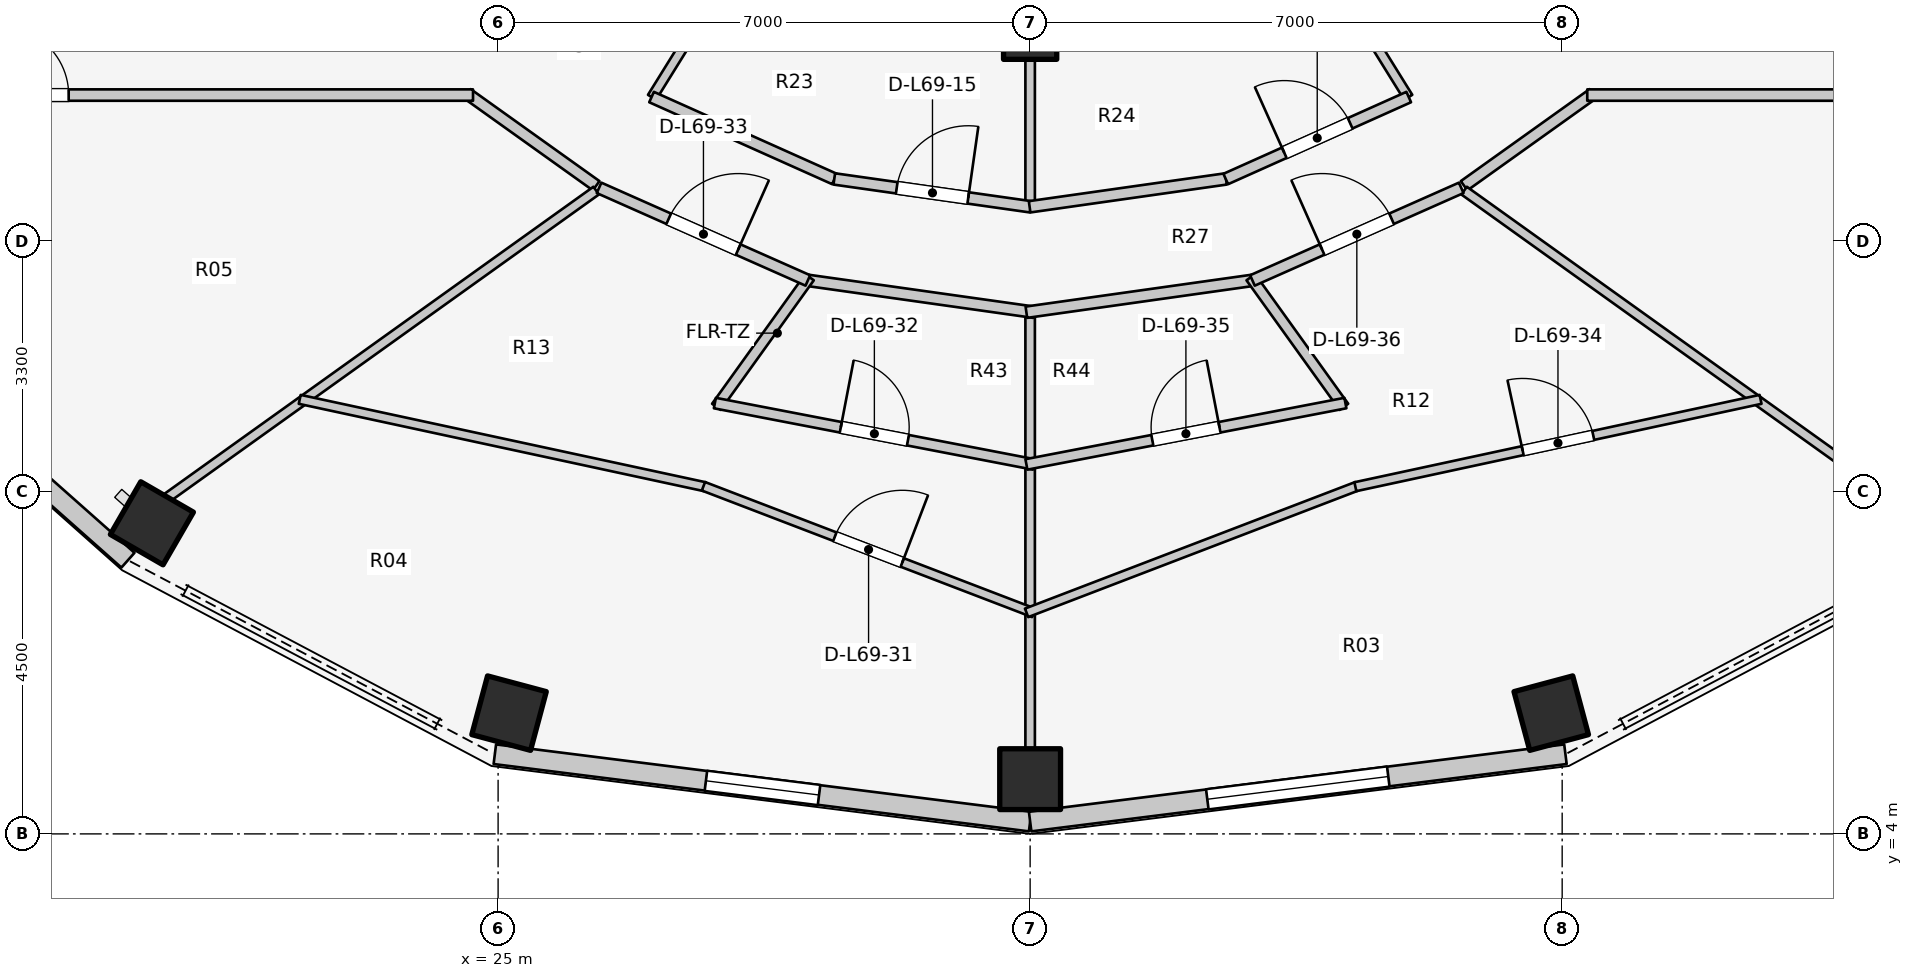
"""IFC4 building model, lengths in metres.
Left out: names, types, materials, properties, quantities, classifications, styles, units other than length and angle.
Written with IfcOpenShell. Run it as: python <this file> out.ifc"""

import sys

from ifc_helpers import new_model, si_unit, direction, frame, frame_2d, origin, origin_2d, place, context, subcontext, project, spatial, rectangle, extrude, element, fill, save


model = new_model("IFC4")
c1 = context("Model", 3, precision=1e-05, world=origin(), true_north=direction((0.0, 1.0)))
c2 = subcontext(c1, "Body", "Model", "MODEL_VIEW")
j1 = project(units=[si_unit("LENGTHUNIT", "METRE"), si_unit("PLANEANGLEUNIT", "RADIAN")], contexts=[c1])
p1 = place(None, origin())
s1 = spatial("IfcSite", under=j1, at=p1, CompositionType="ELEMENT")
p2 = place(p1, origin())
s2 = spatial("IfcBuilding", under=s1, at=p2, CompositionType="ELEMENT")
p3 = place(p2, frame((0.0, 0.0, 226.4)))
s3 = spatial("IfcBuildingStorey", under=s2, at=p3, CompositionType="ELEMENT", Elevation=226.4)
for number, where, z_axis, x_axis in (
    (1, (20.445, 8.086, 0.0), (0.0, 0.0, 1.0), (-0.5, -0.866, 0.0)),
    (2, (25.144, 5.589, 0.0), (0.0, 0.0, 1.0), (-0.259, -0.966, 0.0)),
):
    element("IfcColumn", number, at=place(p3, frame(where, z_axis=z_axis, x_axis=x_axis)), inside=s3, PredefinedType="COLUMN", context=c2, shape_type="SweptSolid", body=[
        extrude(rectangle(XDim=0.8, YDim=0.8, at=origin_2d()), origin(), (0.0, 0.0, 1.0), 3.1),
    ])
p4 = place(p3, frame((32.0, 14.54, 0.0), z_axis=(0.0, 0.0, 1.0), x_axis=(1.0, 0.0, 0.0)))
e3 = element("IfcColumn", 3, at=p4, inside=s3, PredefinedType="COLUMN", context=c2, shape_type="SweptSolid", body=[
    extrude(rectangle(XDim=0.7, YDim=0.7, at=origin_2d()), origin(), (0.0, 0.0, 1.0), 3.1),
])
for number, where, z_axis, x_axis in (
    (4, (32.0, 4.72, 0.0), (0.0, 0.0, 1.0), (0.0, -1.0, 0.0)),
    (5, (38.856, 5.589, 0.0), (0.0, 0.0, 1.0), (0.259, -0.966, 0.0)),
):
    element("IfcColumn", number, at=place(p3, frame(where, z_axis=z_axis, x_axis=x_axis)), inside=s3, PredefinedType="COLUMN", context=c2, shape_type="SweptSolid", body=[
        extrude(rectangle(XDim=0.8, YDim=0.8, at=origin_2d()), origin(), (0.0, 0.0, 1.0), 3.1),
    ])
p5 = place(p3, frame((16.442, 10.871, 0.0), z_axis=(0.0, 0.0, 1.0), x_axis=(0.748165854006, -0.663511759428, 0.0)))
e6 = element("IfcWall", 6, at=p5, inside=s3, PredefinedType="STANDARD", context=c2, shape_type="SweptSolid", body=[
    extrude(rectangle(XDim=4.929, YDim=0.26, at=frame_2d((2.464, 0.0))), origin(), (0.0, 0.0, 1.0), 2.85),
])
p6 = place(p3, frame((24.957, 5.048, 0.0), z_axis=(0.0, 0.0, 1.0), x_axis=(0.992180211307, -0.124813574142, 0.0)))
e7 = element("IfcWall", 7, at=p6, inside=s3, PredefinedType="STANDARD", context=c2, shape_type="SweptSolid", body=[
    extrude(rectangle(XDim=7.098, YDim=0.26, at=frame_2d((3.549, 0.0))), origin(), (0.0, 0.0, 1.0), 2.85),
])
p7 = place(p6, frame((2.799, 0.0, 0.75)))
e8 = element("IfcOpeningElement", 8, at=p7, cuts=e7, PredefinedType="OPENING", context=c2, shape_type="SweptSolid", body=[
    extrude(rectangle(XDim=1.5, YDim=1.6, at=frame_2d((0.75, 0.8))), frame((0.0, 0.14, 0.0), z_axis=(0.0, -1.0, 0.0), x_axis=(1.0, 0.0, 0.0)), (0.0, 0.0, 1.0), 0.28),
])
p8 = place(p3, frame((32.0, 4.162, 0.0), z_axis=(0.0, 0.0, 1.0), x_axis=(0.992180211307, 0.124813574142, 0.0)))
e9 = element("IfcWall", 9, at=p8, inside=s3, PredefinedType="STANDARD", context=c2, shape_type="SweptSolid", body=[
    extrude(rectangle(XDim=7.098, YDim=0.26, at=frame_2d((3.549, 0.0))), origin(), (0.0, 0.0, 1.0), 2.85),
])
p9 = place(p8, frame((2.349, 0.0, 0.75)))
e10 = element("IfcOpeningElement", 10, at=p9, cuts=e9, PredefinedType="OPENING", context=c2, shape_type="SweptSolid", body=[
    extrude(rectangle(XDim=2.4, YDim=1.7, at=frame_2d((1.2, 0.85))), frame((0.0, 0.14, 0.0), z_axis=(0.0, -1.0, 0.0), x_axis=(1.0, 0.0, 0.0)), (0.0, 0.0, 1.0), 0.28),
])
p10 = place(p3, frame((28.45, 15.985, 0.0), z_axis=(0.0, 0.0, 1.0), x_axis=(-0.527527080983, -0.849538215049, 0.0)))
e11 = element("IfcWall", 11, at=p10, inside=s3, PredefinedType="PARTITIONING", context=c2, shape_type="SweptSolid", body=[
    extrude(rectangle(XDim=2.701, YDim=0.125, at=frame_2d((1.351, 0.0))), origin(), (0.0, 0.0, 1.0), 2.376),
])
p11 = place(p3, frame((32.0, 14.9, 0.0), z_axis=(0.0, 0.0, 1.0), x_axis=(0.0, -1.0, 0.0)))
e12 = element("IfcWall", 12, at=p11, inside=s3, PredefinedType="PARTITIONING", context=c2, shape_type="SweptSolid", body=[
    extrude(rectangle(XDim=2.65, YDim=0.125, at=frame_2d((1.325, 0.0))), origin(), (0.0, 0.0, 1.0), 2.376),
])
p12 = place(p3, frame((35.55, 15.985, 0.0), z_axis=(0.0, 0.0, 1.0), x_axis=(0.527527080983, -0.849538215049, 0.0)))
e13 = element("IfcWall", 13, at=p12, inside=s3, PredefinedType="PARTITIONING", context=c2, shape_type="SweptSolid", body=[
    extrude(rectangle(XDim=2.701, YDim=0.125, at=frame_2d((1.351, 0.0))), origin(), (0.0, 0.0, 1.0), 2.376),
])
p13 = place(p3, frame((27.019, 13.694, 0.0), z_axis=(0.0, 0.0, 1.0), x_axis=(0.912628408652, -0.408790151203, 0.0)))
e14 = element("IfcWall", 14, at=p13, inside=s3, PredefinedType="PARTITIONING", context=c2, shape_type="SweptSolid", body=[
    extrude(rectangle(XDim=2.638, YDim=0.15, at=frame_2d((1.319, 0.0))), origin(), (0.0, 0.0, 1.0), 2.376),
])
p14 = place(p3, frame((29.423, 12.617, 0.0), z_axis=(0.0, 0.0, 1.0), x_axis=(0.990078185178, -0.140517569133, 0.0)))
e15 = element("IfcWall", 15, at=p14, inside=s3, PredefinedType="PARTITIONING", context=c2, shape_type="SweptSolid", body=[
    extrude(rectangle(XDim=2.61, YDim=0.15, at=frame_2d((1.305, 0.0))), origin(), (0.0, 0.0, 1.0), 2.376),
])
p15 = place(p14, frame((0.83, 0.0, 0.0)))
e16 = element("IfcOpeningElement", 16, at=p15, cuts=e15, PredefinedType="OPENING", context=c2, shape_type="SweptSolid", body=[
    extrude(rectangle(XDim=0.95, YDim=2.1, at=frame_2d((0.475, 1.05))), frame((0.0, 0.085, 0.0), z_axis=(0.0, -1.0, 0.0), x_axis=(1.0, 0.0, 0.0)), (0.0, 0.0, 1.0), 0.17),
])
p16 = place(p3, frame((31.993, 12.25, 0.0), z_axis=(0.0, 0.0, 1.0), x_axis=(0.990078185178, 0.140517569133, 0.0)))
e17 = element("IfcWall", 17, at=p16, inside=s3, PredefinedType="PARTITIONING", context=c2, shape_type="SweptSolid", body=[
    extrude(rectangle(XDim=2.61, YDim=0.15, at=frame_2d((1.305, 0.0))), origin(), (0.0, 0.0, 1.0), 2.376),
])
p17 = place(p3, frame((34.573, 12.616, 0.0), z_axis=(0.0, 0.0, 1.0), x_axis=(0.912628408652, 0.408790151203, 0.0)))
e18 = element("IfcWall", 18, at=p17, inside=s3, PredefinedType="PARTITIONING", context=c2, shape_type="SweptSolid", body=[
    extrude(rectangle(XDim=2.638, YDim=0.15, at=frame_2d((1.319, 0.0))), origin(), (0.0, 0.0, 1.0), 2.376),
])
p18 = place(p17, frame((0.844, 0.0, 0.0)))
e19 = element("IfcOpeningElement", 19, at=p18, cuts=e18, PredefinedType="OPENING", context=c2, shape_type="SweptSolid", body=[
    extrude(rectangle(XDim=0.95, YDim=2.1, at=frame_2d((0.475, 1.05))), frame((0.0, 0.085, 0.0), z_axis=(0.0, -1.0, 0.0), x_axis=(1.0, 0.0, 0.0)), (0.0, 0.0, 1.0), 0.17),
])
p19 = place(p3, frame((26.29, 12.527, 0.0), z_axis=(0.0, 0.0, 1.0), x_axis=(-0.813780999276, 0.581171648669, 0.0)))
e20 = element("IfcWall", 20, at=p19, inside=s3, PredefinedType="PARTITIONING", context=c2, shape_type="SweptSolid", body=[
    extrude(rectangle(XDim=2.082, YDim=0.15, at=frame_2d((1.041, 0.0))), origin(), (0.0, 0.0, 1.0), 2.376),
])
p20 = place(p3, frame((17.15, 13.72, 0.0), z_axis=(0.0, 0.0, 1.0), x_axis=(1.0, 0.0, 0.0)))
e21 = element("IfcWall", 21, at=p20, inside=s3, PredefinedType="PARTITIONING", context=c2, shape_type="SweptSolid", body=[
    extrude(rectangle(XDim=7.52, YDim=0.15, at=frame_2d((3.76, 0.0))), origin(), (0.0, 0.0, 1.0), 2.376),
])
p21 = place(p20, frame((1.3, 0.0, 0.0)))
e22 = element("IfcOpeningElement", 22, at=p21, cuts=e21, PredefinedType="OPENING", context=c2, shape_type="SweptSolid", body=[
    extrude(rectangle(XDim=0.9, YDim=2.1, at=frame_2d((0.45, 1.05))), frame((0.0, 0.085, 0.0), z_axis=(0.0, -1.0, 0.0), x_axis=(1.0, 0.0, 0.0)), (0.0, 0.0, 1.0), 0.17),
])
p22 = place(p3, frame((37.71, 12.527, 0.0), z_axis=(0.0, 0.0, 1.0), x_axis=(0.813780999276, 0.581171648669, 0.0)))
e23 = element("IfcWall", 23, at=p22, inside=s3, PredefinedType="PARTITIONING", context=c2, shape_type="SweptSolid", body=[
    extrude(rectangle(XDim=2.082, YDim=0.15, at=frame_2d((1.041, 0.0))), origin(), (0.0, 0.0, 1.0), 2.376),
])
p23 = place(p3, frame((39.33, 13.72, 0.0), z_axis=(0.0, 0.0, 1.0), x_axis=(1.0, 0.0, 0.0)))
e24 = element("IfcWall", 24, at=p23, inside=s3, PredefinedType="PARTITIONING", context=c2, shape_type="SweptSolid", body=[
    extrude(rectangle(XDim=7.52, YDim=0.15, at=frame_2d((3.76, 0.0))), origin(), (0.0, 0.0, 1.0), 2.376),
])
p24 = place(p23, frame((5.22, 0.0, 0.0)))
e25 = element("IfcOpeningElement", 25, at=p24, cuts=e24, PredefinedType="OPENING", context=c2, shape_type="SweptSolid", body=[
    extrude(rectangle(XDim=0.9, YDim=2.1, at=frame_2d((0.45, 1.05))), frame((0.0, 0.085, 0.0), z_axis=(0.0, -1.0, 0.0), x_axis=(1.0, 0.0, 0.0)), (0.0, 0.0, 1.0), 0.17),
])
p25 = place(p3, frame((26.29, 12.463, 0.0), z_axis=(0.0, 0.0, 1.0), x_axis=(-0.813163816543, -0.582034885093, 0.0)))
e26 = element("IfcWall", 26, at=p25, inside=s3, PredefinedType="PARTITIONING", context=c2, shape_type="SweptSolid", body=[
    extrude(rectangle(XDim=6.955, YDim=0.125, at=frame_2d((3.477, 0.0))), origin(), (0.0, 0.0, 1.0), 2.376),
])
p26 = place(p3, frame((32.0, 10.815, 0.0), z_axis=(0.0, 0.0, 1.0), x_axis=(0.0, -1.0, 0.0)))
e27 = element("IfcWall", 27, at=p26, inside=s3, PredefinedType="PARTITIONING", context=c2, shape_type="SweptSolid", body=[
    extrude(rectangle(XDim=5.715, YDim=0.125, at=frame_2d((2.857, 0.0))), origin(), (0.0, 0.0, 1.0), 2.376),
])
p27 = place(p3, frame((37.71, 12.463, 0.0), z_axis=(0.0, 0.0, 1.0), x_axis=(0.813163816543, -0.582034885093, 0.0)))
e28 = element("IfcWall", 28, at=p27, inside=s3, PredefinedType="PARTITIONING", context=c2, shape_type="SweptSolid", body=[
    extrude(rectangle(XDim=6.955, YDim=0.125, at=frame_2d((3.477, 0.0))), origin(), (0.0, 0.0, 1.0), 2.376),
])
p28 = place(p3, frame((22.39, 9.717, 0.0), z_axis=(0.0, 0.0, 1.0), x_axis=(0.977534972695, -0.210773283785, 0.0)))
e29 = element("IfcWall", 29, at=p28, inside=s3, PredefinedType="MOVABLE", context=c2, shape_type="SweptSolid", body=[
    extrude(rectangle(XDim=5.453, YDim=0.12, at=frame_2d((2.727, 0.0))), origin(), (0.0, 0.0, 1.0), 2.376),
])
p29 = place(p3, frame((27.702, 8.573, 0.0), z_axis=(0.0, 0.0, 1.0), x_axis=(0.933766866443, -0.357881878744, 0.0)))
e30 = element("IfcWall", 30, at=p29, inside=s3, PredefinedType="MOVABLE", context=c2, shape_type="SweptSolid", body=[
    extrude(rectangle(XDim=4.653, YDim=0.12, at=frame_2d((2.327, 0.0))), origin(), (0.0, 0.0, 1.0), 2.376),
])
p30 = place(p29, frame((1.852, 0.0, 0.0)))
e31 = element("IfcOpeningElement", 31, at=p30, cuts=e30, PredefinedType="OPENING", context=c2, shape_type="SweptSolid", body=[
    extrude(rectangle(XDim=0.95, YDim=2.1, at=frame_2d((0.475, 1.05))), frame((0.0, 0.07, 0.0), z_axis=(0.0, -1.0, 0.0), x_axis=(1.0, 0.0, 0.0)), (0.0, 0.0, 1.0), 0.14),
])
p31 = place(p3, frame((29.018, 11.29, 0.0), z_axis=(0.0, 0.0, 1.0), x_axis=(0.990214091671, -0.13955662885, 0.0)))
e32 = element("IfcWall", 32, at=p31, inside=s3, PredefinedType="PARTITIONING", context=c2, shape_type="SweptSolid", body=[
    extrude(rectangle(XDim=3.062, YDim=0.15, at=frame_2d((1.531, 0.0))), origin(), (0.0, 0.0, 1.0), 2.376),
])
p32 = place(p3, frame((29.097, 11.324, 0.0), z_axis=(0.0, 0.0, 1.0), x_axis=(-0.583259891741, -0.812285601673, 0.0)))
e33 = element("IfcWall", 33, at=p32, inside=s3, PredefinedType="PLUMBINGWALL", context=c2, shape_type="SweptSolid", body=[
    extrude(rectangle(XDim=2.1, YDim=0.14, at=frame_2d((1.05, 0.0))), origin(), (0.0, 0.0, 1.0), 2.385),
])
p33 = place(p3, frame((27.852, 9.668, 0.0), z_axis=(0.0, 0.0, 1.0), x_axis=(0.98198484664, -0.188959680803, 0.0)))
e34 = element("IfcWall", 34, at=p33, inside=s3, PredefinedType="PLUMBINGWALL", context=c2, shape_type="SweptSolid", body=[
    extrude(rectangle(XDim=4.274, YDim=0.14, at=frame_2d((2.137, 0.0))), origin(), (0.0, 0.0, 1.0), 2.376),
])
p34 = place(p33, frame((1.687, 0.0, 0.0)))
e35 = element("IfcOpeningElement", 35, at=p34, cuts=e34, PredefinedType="OPENING", context=c2, shape_type="SweptSolid", body=[
    extrude(rectangle(XDim=0.9, YDim=2.1, at=frame_2d((0.45, 1.05))), frame((0.0, 0.08, 0.0), z_axis=(0.0, -1.0, 0.0), x_axis=(1.0, 0.0, 0.0)), (0.0, 0.0, 1.0), 0.16),
])
p35 = place(p3, frame((26.328, 12.499, 0.0), z_axis=(0.0, 0.0, 1.0), x_axis=(0.914139569865, -0.405399613724, 0.0)))
e36 = element("IfcWall", 36, at=p35, inside=s3, PredefinedType="PARTITIONING", context=c2, shape_type="SweptSolid", body=[
    extrude(rectangle(XDim=3.005, YDim=0.15, at=frame_2d((1.502, 0.0))), origin(), (0.0, 0.0, 1.0), 2.376),
])
p36 = place(p35, frame((1.002, 0.0, 0.0)))
e37 = element("IfcOpeningElement", 37, at=p36, cuts=e36, PredefinedType="OPENING", context=c2, shape_type="SweptSolid", body=[
    extrude(rectangle(XDim=1.0, YDim=2.1, at=frame_2d((0.5, 1.05))), frame((0.0, 0.085, 0.0), z_axis=(0.0, -1.0, 0.0), x_axis=(1.0, 0.0, 0.0)), (0.0, 0.0, 1.0), 0.17),
])
p37 = place(p3, frame((31.953, 6.908, 0.0), z_axis=(0.0, 0.0, 1.0), x_axis=(0.933766866443, 0.357881878744, 0.0)))
e38 = element("IfcWall", 38, at=p37, inside=s3, PredefinedType="MOVABLE", context=c2, shape_type="SweptSolid", body=[
    extrude(rectangle(XDim=4.653, YDim=0.12, at=frame_2d((2.327, 0.0))), origin(), (0.0, 0.0, 1.0), 2.376),
])
p38 = place(p3, frame((36.279, 8.567, 0.0), z_axis=(0.0, 0.0, 1.0), x_axis=(0.977534972695, 0.210773283785, 0.0)))
e39 = element("IfcWall", 39, at=p38, inside=s3, PredefinedType="MOVABLE", context=c2, shape_type="SweptSolid", body=[
    extrude(rectangle(XDim=5.453, YDim=0.12, at=frame_2d((2.727, 0.0))), origin(), (0.0, 0.0, 1.0), 2.376),
])
p39 = place(p38, frame((2.252, 0.0, 0.0)))
e40 = element("IfcOpeningElement", 40, at=p39, cuts=e39, PredefinedType="OPENING", context=c2, shape_type="SweptSolid", body=[
    extrude(rectangle(XDim=0.95, YDim=2.1, at=frame_2d((0.475, 1.05))), frame((0.0, 0.07, 0.0), z_axis=(0.0, -1.0, 0.0), x_axis=(1.0, 0.0, 0.0)), (0.0, 0.0, 1.0), 0.14),
])
p40 = place(p3, frame((31.95, 10.863, 0.0), z_axis=(0.0, 0.0, 1.0), x_axis=(0.990214091671, 0.13955662885, 0.0)))
e41 = element("IfcWall", 41, at=p40, inside=s3, PredefinedType="PARTITIONING", context=c2, shape_type="SweptSolid", body=[
    extrude(rectangle(XDim=3.062, YDim=0.15, at=frame_2d((1.531, 0.0))), origin(), (0.0, 0.0, 1.0), 2.376),
])
p41 = place(p3, frame((34.903, 11.324, 0.0), z_axis=(0.0, 0.0, 1.0), x_axis=(0.583259891741, -0.812285601673, 0.0)))
e42 = element("IfcWall", 42, at=p41, inside=s3, PredefinedType="PLUMBINGWALL", context=c2, shape_type="SweptSolid", body=[
    extrude(rectangle(XDim=2.1, YDim=0.14, at=frame_2d((1.05, 0.0))), origin(), (0.0, 0.0, 1.0), 2.385),
])
p42 = place(p3, frame((31.951, 8.861, 0.0), z_axis=(0.0, 0.0, 1.0), x_axis=(0.98198484664, 0.188959680803, 0.0)))
e43 = element("IfcWall", 43, at=p42, inside=s3, PredefinedType="PLUMBINGWALL", context=c2, shape_type="SweptSolid", body=[
    extrude(rectangle(XDim=4.274, YDim=0.14, at=frame_2d((2.137, 0.0))), origin(), (0.0, 0.0, 1.0), 2.376),
])
p43 = place(p42, frame((1.687, 0.0, 0.0)))
e44 = element("IfcOpeningElement", 44, at=p43, cuts=e43, PredefinedType="OPENING", context=c2, shape_type="SweptSolid", body=[
    extrude(rectangle(XDim=0.9, YDim=2.1, at=frame_2d((0.45, 1.05))), frame((0.0, 0.08, 0.0), z_axis=(0.0, -1.0, 0.0), x_axis=(1.0, 0.0, 0.0)), (0.0, 0.0, 1.0), 0.16),
])
p44 = place(p3, frame((34.925, 11.281, 0.0), z_axis=(0.0, 0.0, 1.0), x_axis=(0.914139569865, 0.405399613724, 0.0)))
e45 = element("IfcWall", 45, at=p44, inside=s3, PredefinedType="PARTITIONING", context=c2, shape_type="SweptSolid", body=[
    extrude(rectangle(XDim=3.005, YDim=0.15, at=frame_2d((1.502, 0.0))), origin(), (0.0, 0.0, 1.0), 2.376),
])
p45 = place(p44, frame((1.002, 0.0, 0.0)))
e46 = element("IfcOpeningElement", 46, at=p45, cuts=e45, PredefinedType="OPENING", context=c2, shape_type="SweptSolid", body=[
    extrude(rectangle(XDim=1.0, YDim=2.1, at=frame_2d((0.5, 1.05))), frame((0.0, 0.085, 0.0), z_axis=(0.0, -1.0, 0.0), x_axis=(1.0, 0.0, 0.0)), (0.0, 0.0, 1.0), 0.17),
])
p46 = place(p7, origin())
e47 = element("IfcWindow", 47, at=p46, inside=s3, PartitioningType="SINGLE_PANEL", PredefinedType="WINDOW", context=c2, shape_type="SweptSolid", body=[
    extrude(rectangle(XDim=1.5, YDim=1.6, at=frame_2d((0.75, 0.8))), frame((0.0, 0.03, 0.0), z_axis=(0.0, -1.0, 0.0), x_axis=(1.0, 0.0, 0.0)), (0.0, 0.0, 1.0), 0.06),
])
fill(e8, e47)
p47 = place(p9, origin())
e48 = element("IfcWindow", 48, at=p47, inside=s3, PartitioningType="SINGLE_PANEL", PredefinedType="WINDOW", context=c2, shape_type="SweptSolid", body=[
    extrude(rectangle(XDim=2.4, YDim=1.7, at=frame_2d((1.2, 0.85))), frame((0.0, 0.03, 0.0), z_axis=(0.0, -1.0, 0.0), x_axis=(1.0, 0.0, 0.0)), (0.0, 0.0, 1.0), 0.06),
])
fill(e10, e48)
p48 = place(p15, origin())
e49 = element("IfcDoor", 49, at=p48, inside=s3, OperationType="SINGLE_SWING_RIGHT", PredefinedType="DOOR", context=c2, shape_type="SweptSolid", body=[
    extrude(rectangle(XDim=0.95, YDim=2.1, at=frame_2d((0.475, 1.05))), frame((0.0, 0.025, 0.0), z_axis=(0.0, -1.0, 0.0), x_axis=(1.0, 0.0, 0.0)), (0.0, 0.0, 1.0), 0.05),
])
fill(e16, e49)
p49 = place(p18, origin())
e50 = element("IfcDoor", 50, at=p49, inside=s3, OperationType="SINGLE_SWING_LEFT", PredefinedType="DOOR", context=c2, shape_type="SweptSolid", body=[
    extrude(rectangle(XDim=0.95, YDim=2.1, at=frame_2d((0.475, 1.05))), frame((0.0, 0.025, 0.0), z_axis=(0.0, -1.0, 0.0), x_axis=(1.0, 0.0, 0.0)), (0.0, 0.0, 1.0), 0.05),
])
fill(e19, e50)
p50 = place(p21, origin())
e51 = element("IfcDoor", 51, at=p50, inside=s3, OperationType="SINGLE_SWING_LEFT", PredefinedType="DOOR", context=c2, shape_type="SweptSolid", body=[
    extrude(rectangle(XDim=0.9, YDim=2.1, at=frame_2d((0.45, 1.05))), frame((0.0, 0.025, 0.0), z_axis=(0.0, -1.0, 0.0), x_axis=(1.0, 0.0, 0.0)), (0.0, 0.0, 1.0), 0.05),
])
fill(e22, e51)
p51 = place(p30, origin())
e52 = element("IfcDoor", 52, at=p51, inside=s3, OperationType="SINGLE_SWING_RIGHT", PredefinedType="DOOR", context=c2, shape_type="SweptSolid", body=[
    extrude(rectangle(XDim=0.95, YDim=2.1, at=frame_2d((0.475, 1.05))), frame((0.0, 0.025, 0.0), z_axis=(0.0, -1.0, 0.0), x_axis=(1.0, 0.0, 0.0)), (0.0, 0.0, 1.0), 0.05),
])
fill(e31, e52)
p52 = place(p34, origin())
e53 = element("IfcDoor", 53, at=p52, inside=s3, OperationType="SINGLE_SWING_LEFT", PredefinedType="DOOR", context=c2, shape_type="SweptSolid", body=[
    extrude(rectangle(XDim=0.9, YDim=2.1, at=frame_2d((0.45, 1.05))), frame((0.0, 0.025, 0.0), z_axis=(0.0, -1.0, 0.0), x_axis=(1.0, 0.0, 0.0)), (0.0, 0.0, 1.0), 0.05),
])
fill(e35, e53)
p53 = place(p36, origin())
e54 = element("IfcDoor", 54, at=p53, inside=s3, OperationType="SINGLE_SWING_RIGHT", PredefinedType="DOOR", context=c2, shape_type="SweptSolid", body=[
    extrude(rectangle(XDim=1.0, YDim=2.1, at=frame_2d((0.5, 1.05))), frame((0.0, 0.025, 0.0), z_axis=(0.0, -1.0, 0.0), x_axis=(1.0, 0.0, 0.0)), (0.0, 0.0, 1.0), 0.05),
])
fill(e37, e54)
p54 = place(p39, origin())
e55 = element("IfcDoor", 55, at=p54, inside=s3, OperationType="SINGLE_SWING_LEFT", PredefinedType="DOOR", context=c2, shape_type="SweptSolid", body=[
    extrude(rectangle(XDim=0.95, YDim=2.1, at=frame_2d((0.475, 1.05))), frame((0.0, 0.025, 0.0), z_axis=(0.0, -1.0, 0.0), x_axis=(1.0, 0.0, 0.0)), (0.0, 0.0, 1.0), 0.05),
])
fill(e40, e55)
p55 = place(p43, origin())
e56 = element("IfcDoor", 56, at=p55, inside=s3, OperationType="SINGLE_SWING_RIGHT", PredefinedType="DOOR", context=c2, shape_type="SweptSolid", body=[
    extrude(rectangle(XDim=0.9, YDim=2.1, at=frame_2d((0.45, 1.05))), frame((0.0, 0.025, 0.0), z_axis=(0.0, -1.0, 0.0), x_axis=(1.0, 0.0, 0.0)), (0.0, 0.0, 1.0), 0.05),
])
fill(e44, e56)
p56 = place(p45, origin())
e57 = element("IfcDoor", 57, at=p56, inside=s3, OperationType="SINGLE_SWING_LEFT", PredefinedType="DOOR", context=c2, shape_type="SweptSolid", body=[
    extrude(rectangle(XDim=1.0, YDim=2.1, at=frame_2d((0.5, 1.05))), frame((0.0, 0.025, 0.0), z_axis=(0.0, -1.0, 0.0), x_axis=(1.0, 0.0, 0.0)), (0.0, 0.0, 1.0), 0.05),
])
fill(e46, e57)
save(model, sys.argv[1])
